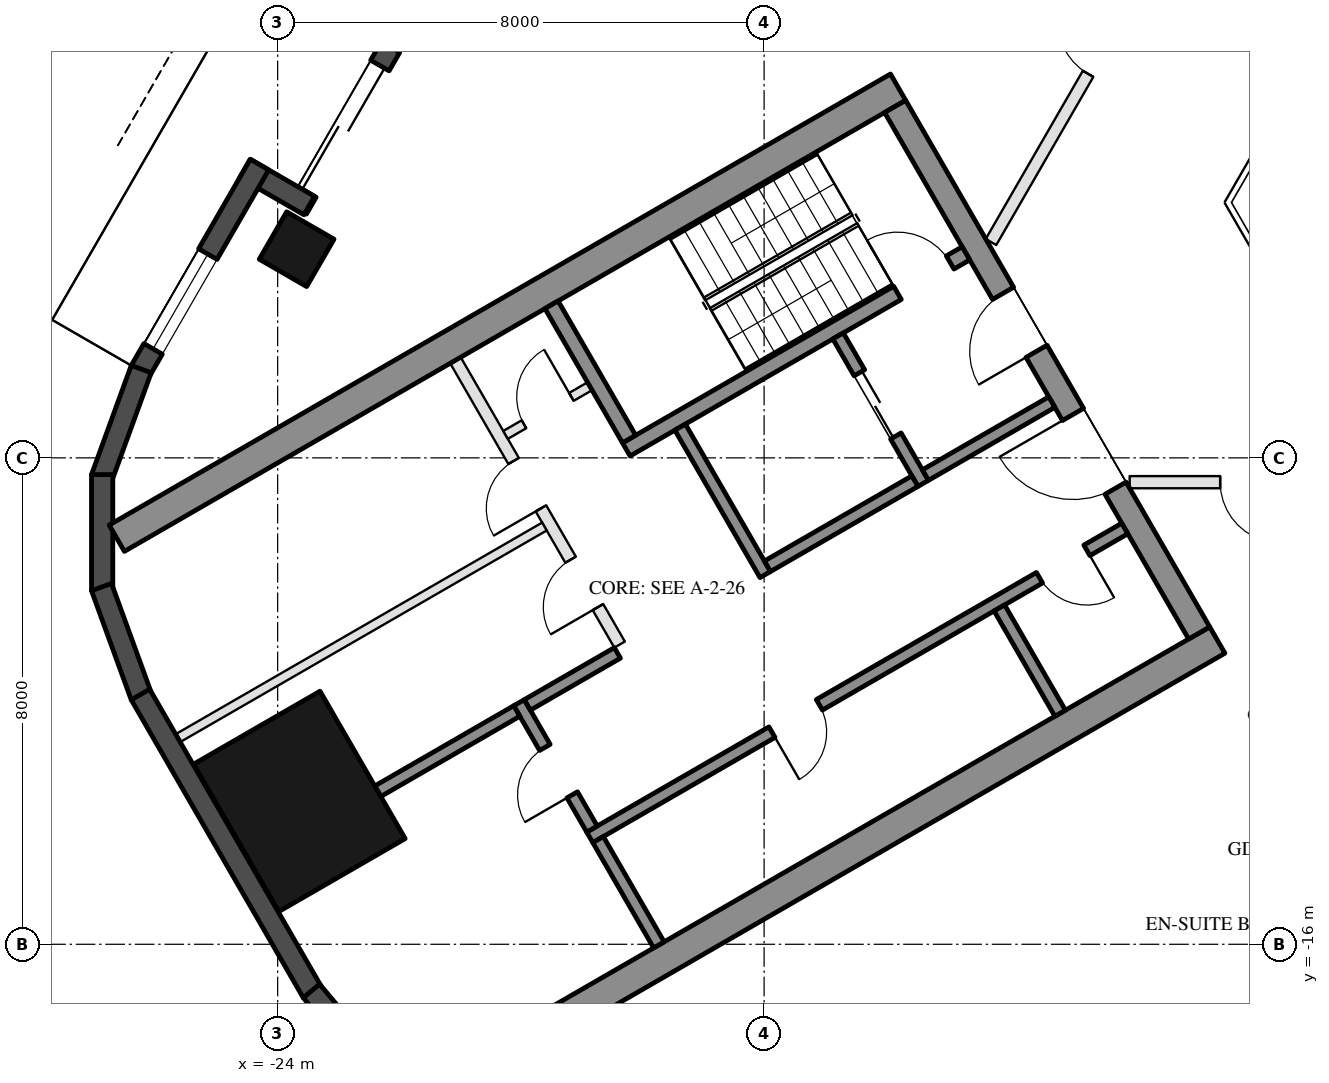
"""IFC4 building model, lengths in metres.
Left out: names, types, materials, properties, quantities, classifications, styles, units other than length and angle.
Written with IfcOpenShell. Run it as: python <this file> out.ifc"""

import sys

from ifc_helpers import new_model, si_unit, direction, frame, frame_2d, origin, origin_2d, place, context, subcontext, project, spatial, rectangle, hollow_rectangle, extrude, element, fill, save


model = new_model("IFC4")
c1 = context("Model", 3, precision=1e-05, world=origin(), true_north=direction((0.0, 1.0)))
c2 = subcontext(c1, "Body", "Model", "MODEL_VIEW")
j1 = project(units=[si_unit("LENGTHUNIT", "METRE"), si_unit("PLANEANGLEUNIT", "RADIAN")], contexts=[c1])
p1 = place(None, origin())
s1 = spatial("IfcSite", under=j1, at=p1, CompositionType="ELEMENT")
p2 = place(p1, origin())
s2 = spatial("IfcBuilding", under=s1, at=p2, CompositionType="ELEMENT")
p3 = place(p2, frame((0.0, 0.0, 116.8)))
s3 = spatial("IfcBuildingStorey", under=s2, at=p3, CompositionType="ELEMENT", Elevation=116.8)
p4 = place(p3, frame((-23.688, -4.568, 0.0), z_axis=(0.0, 0.0, 1.0), x_axis=(0.5, 0.866025403784, 0.0)))
e1 = element("IfcColumn", 1, at=p4, inside=s3, PredefinedType="COLUMN", context=c2, shape_type="SweptSolid", body=[
    extrude(hollow_rectangle(XDim=0.9, YDim=0.9, WallThickness=0.04, at=origin_2d()), origin(), (0.0, 0.0, 1.0), 3.7),
])
p5 = place(p3, frame((-23.643, -13.65, 0.0), z_axis=(0.0, 0.0, 1.0), x_axis=(-0.5, 0.866025403784, 0.0)))
e2 = element("IfcColumn", 2, at=p5, inside=s3, PredefinedType="COLUMN", context=c2, shape_type="SweptSolid", body=[
    extrude(hollow_rectangle(XDim=2.8, YDim=2.4, WallThickness=0.07, at=origin_2d()), origin(), (0.0, 0.0, 1.0), 3.7),
])
p6 = place(p3, frame((-20.309, 1.934, 0.0), z_axis=(0.0, 0.0, 1.0), x_axis=(-0.499992114976, -0.866029956157, 0.0)))
e3 = element("IfcWall", 3, at=p6, inside=s3, PredefinedType="SOLIDWALL", context=c2, shape_type="SweptSolid", body=[
    extrude(rectangle(XDim=6.74, YDim=0.35, at=frame_2d((3.37, 0.0))), origin(), (0.0, 0.0, 1.0), 3.55),
])
p7 = place(p6, frame((4.02, 0.0, 0.0)))
e4 = element("IfcOpeningElement", 4, at=p7, cuts=e3, PredefinedType="OPENING", context=c2, shape_type="SweptSolid", body=[
    extrude(rectangle(XDim=2.4, YDim=2.4, at=frame_2d((1.2, 1.2))), frame((0.0, 0.185, 0.0), z_axis=(0.0, -1.0, 0.0), x_axis=(1.0, 0.0, 0.0)), (0.0, 0.0, 1.0), 0.37),
])
p8 = place(p6, frame((0.77, 0.0, 0.3)))
e5 = element("IfcOpeningElement", 5, at=p8, cuts=e3, PredefinedType="OPENING", context=c2, shape_type="SweptSolid", body=[
    extrude(rectangle(XDim=2.9, YDim=2.65, at=frame_2d((1.45, 1.325))), frame((0.0, 0.185, 0.0), z_axis=(0.0, -1.0, 0.0), x_axis=(1.0, 0.0, 0.0)), (0.0, 0.0, 1.0), 0.37),
])
p9 = place(p3, frame((-23.481, -3.85, 0.0), z_axis=(0.0, 0.0, 1.0), x_axis=(-0.866092288191, 0.499884134912, 0.0)))
e6 = element("IfcWall", 6, at=p9, inside=s3, PredefinedType="SOLIDWALL", context=c2, shape_type="SweptSolid", body=[
    extrude(rectangle(XDim=1.22, YDim=0.35, at=frame_2d((0.61, 0.0))), origin(), (0.0, 0.0, 1.0), 3.55),
])
p10 = place(p3, frame((-24.299, -3.176, 0.0), z_axis=(0.0, 0.0, 1.0), x_axis=(-0.500028278809, -0.866009076391, 0.0)))
e7 = element("IfcWall", 7, at=p10, inside=s3, PredefinedType="SOLIDWALL", context=c2, shape_type="SweptSolid", body=[
    extrude(rectangle(XDim=3.916, YDim=0.35, at=frame_2d((1.958, 0.0))), origin(), (0.0, 0.0, 1.0), 3.55),
])
p11 = place(p10, frame((1.7, 0.0, 0.3)))
e8 = element("IfcOpeningElement", 8, at=p11, cuts=e7, PredefinedType="OPENING", context=c2, shape_type="SweptSolid", body=[
    extrude(rectangle(XDim=1.8, YDim=2.65, at=frame_2d((0.9, 1.325))), frame((0.0, 0.185, 0.0), z_axis=(0.0, -1.0, 0.0), x_axis=(1.0, 0.0, 0.0)), (0.0, 0.0, 1.0), 0.37),
])
for number, where, z_axis, x_axis in (
    (9, (-26.244, -6.54, 0.0), (0.0, 0.0, 1.0), (-0.342, -0.94, 0.0)),
    (10, (-26.886, -8.275, 0.0), (0.0, 0.0, 1.0), (0.0, -1.0, 0.0)),
    (11, (-26.897, -10.125, 0.0), (0.0, 0.0, 1.0), (0.342, -0.94, 0.0)),
):
    element("IfcWall", number, at=place(p3, frame(where, z_axis=z_axis, x_axis=x_axis)), inside=s3, PredefinedType="SOLIDWALL", context=c2, shape_type="SweptSolid", body=[
        extrude(rectangle(XDim=1.91, YDim=0.35, at=frame_2d((0.955, 0.0))), origin(), (0.0, 0.0, 1.0), 3.55),
    ])
p12 = place(p3, frame((-26.257, -11.893, 0.0), z_axis=(0.0, 0.0, 1.0), x_axis=(0.500018773155, -0.866014564827, 0.0)))
e12 = element("IfcWall", 12, at=p12, inside=s3, PredefinedType="SOLIDWALL", context=c2, shape_type="SweptSolid", body=[
    extrude(rectangle(XDim=5.658, YDim=0.35, at=frame_2d((2.829, 0.0))), origin(), (0.0, 0.0, 1.0), 3.55),
])
p13 = place(p3, frame((-23.445, -16.768, 0.0), z_axis=(0.0, 0.0, 1.0), x_axis=(0.642733291068, -0.76609001857, 0.0)))
e13 = element("IfcWall", 13, at=p13, inside=s3, PredefinedType="SOLIDWALL", context=c2, shape_type="SweptSolid", body=[
    extrude(rectangle(XDim=1.91, YDim=0.35, at=frame_2d((0.955, 0.0))), origin(), (0.0, 0.0, 1.0), 3.55),
])
for number, where, z_axis, x_axis in (
    (14, (-13.797, -1.903, 0.0), (0.0, 0.0, 1.0), (-0.866, -0.5, 0.0)),
    (15, (-8.547, -10.997, 0.0), (0.0, 0.0, 1.0), (-0.866, -0.5, 0.0)),
):
    element("IfcWall", number, at=place(p3, frame(where, z_axis=z_axis, x_axis=x_axis)), inside=s3, PredefinedType="SHEAR", context=c2, shape_type="SweptSolid", body=[
        extrude(rectangle(XDim=14.837, YDim=0.5, at=frame_2d((7.418, 0.0))), origin(), (0.0, 0.0, 1.0), 3.5),
    ])
p14 = place(p3, frame((-13.845, -2.22, 0.0), z_axis=(0.0, 0.0, 1.0), x_axis=(0.500004234368, -0.866022959057, 0.0)))
e16 = element("IfcWall", 16, at=p14, inside=s3, PredefinedType="SHEAR", context=c2, shape_type="SweptSolid", body=[
    extrude(rectangle(XDim=10.0, YDim=0.4, at=frame_2d((5.0, 0.0))), origin(), (0.0, 0.0, 1.0), 3.5),
])
p15 = place(p14, frame((3.55, 0.0, 0.0)))
e17 = element("IfcOpeningElement", 17, at=p15, cuts=e16, PredefinedType="OPENING", context=c2, shape_type="SweptSolid", body=[
    extrude(rectangle(XDim=1.1, YDim=2.1, at=frame_2d((0.55, 1.05))), frame((0.0, 0.21, 0.0), z_axis=(0.0, -1.0, 0.0), x_axis=(1.0, 0.0, 0.0)), (0.0, 0.0, 1.0), 0.42),
])
p16 = place(p14, frame((5.85, 0.0, 0.0)))
e18 = element("IfcOpeningElement", 18, at=p16, cuts=e16, PredefinedType="OPENING", context=c2, shape_type="SweptSolid", body=[
    extrude(rectangle(XDim=1.4, YDim=2.1, at=frame_2d((0.7, 1.05))), frame((0.0, 0.21, 0.0), z_axis=(0.0, -1.0, 0.0), x_axis=(1.0, 0.0, 0.0)), (0.0, 0.0, 1.0), 0.42),
])
p17 = place(p3, frame((-12.681, -4.636, 0.0), z_axis=(0.0, 0.0, 1.0), x_axis=(-0.866021702275, -0.500006411147, 0.0)))
e19 = element("IfcWall", 19, at=p17, inside=s3, PredefinedType="SHEAR", context=c2, shape_type="SweptSolid", body=[
    extrude(rectangle(XDim=6.45, YDim=0.25, at=frame_2d((3.225, 0.0))), origin(), (0.0, 0.0, 1.0), 3.5),
])
p18 = place(p17, frame((0.3, 0.0, 0.0)))
e20 = element("IfcOpeningElement", 20, at=p18, cuts=e19, PredefinedType="OPENING", context=c2, shape_type="SweptSolid", body=[
    extrude(rectangle(XDim=1.0, YDim=2.1, at=frame_2d((0.5, 1.05))), frame((0.0, 0.135, 0.0), z_axis=(0.0, -1.0, 0.0), x_axis=(1.0, 0.0, 0.0)), (0.0, 0.0, 1.0), 0.27),
])
p19 = place(p3, frame((-19.496, -5.482, 0.0), z_axis=(0.0, 0.0, 1.0), x_axis=(0.499990435942, -0.866030925526, 0.0)))
e21 = element("IfcWall", 21, at=p19, inside=s3, PredefinedType="SHEAR", context=c2, shape_type="SweptSolid", body=[
    extrude(rectangle(XDim=2.55, YDim=0.25, at=frame_2d((1.275, 0.0))), origin(), (0.0, 0.0, 1.0), 3.5),
])
p20 = place(p3, frame((-17.381, -7.495, 0.0), z_axis=(0.0, 0.0, 1.0), x_axis=(0.500011755427, -0.866018616679, 0.0)))
e22 = element("IfcWall", 22, at=p20, inside=s3, PredefinedType="SHEAR", context=c2, shape_type="SweptSolid", body=[
    extrude(rectangle(XDim=2.8, YDim=0.2, at=frame_2d((1.4, 0.0))), origin(), (0.0, 0.0, 1.0), 3.5),
])
p21 = place(p3, frame((-14.783, -5.995, 0.0), z_axis=(0.0, 0.0, 1.0), x_axis=(0.49994636267, -0.866056369097, 0.0)))
e23 = element("IfcWall", 23, at=p21, inside=s3, PredefinedType="SHEAR", context=c2, shape_type="SweptSolid", body=[
    extrude(rectangle(XDim=2.8, YDim=0.2, at=frame_2d((1.4, 0.0))), origin(), (0.0, 0.0, 1.0), 3.5),
])
p22 = place(p21, frame((0.7, 0.0, 0.0)))
e24 = element("IfcOpeningElement", 24, at=p22, cuts=e23, PredefinedType="OPENING", context=c2, shape_type="SweptSolid", body=[
    extrude(rectangle(XDim=1.2, YDim=2.1, at=frame_2d((0.6, 1.05))), frame((0.0, 0.11, 0.0), z_axis=(0.0, -1.0, 0.0), x_axis=(1.0, 0.0, 0.0)), (0.0, 0.0, 1.0), 0.22),
])
p23 = place(p3, frame((-13.52, -8.383, 0.0), z_axis=(0.0, 0.0, 1.0), x_axis=(-0.866034573852, -0.49998411664, 0.0)))
e25 = element("IfcWall", 25, at=p23, inside=s3, PredefinedType="SHEAR", context=c2, shape_type="SweptSolid", body=[
    extrude(rectangle(XDim=2.8, YDim=0.2, at=frame_2d((1.4, 0.0))), origin(), (0.0, 0.0, 1.0), 3.5),
])
p24 = place(p3, frame((-11.268, -7.083, 0.0), z_axis=(0.0, 0.0, 1.0), x_axis=(-0.866050077142, -0.499957262057, 0.0)))
e26 = element("IfcWall", 26, at=p24, inside=s3, PredefinedType="SHEAR", context=c2, shape_type="SweptSolid", body=[
    extrude(rectangle(XDim=2.4, YDim=0.2, at=frame_2d((1.2, 0.0))), origin(), (0.0, 0.0, 1.0), 3.5),
])
p25 = place(p3, frame((-10.068, -9.162, 0.0), z_axis=(0.0, 0.0, 1.0), x_axis=(-0.866032725843, -0.499987317609, 0.0)))
e27 = element("IfcWall", 27, at=p25, inside=s3, PredefinedType="SHEAR", context=c2, shape_type="SweptSolid", body=[
    extrude(rectangle(XDim=10.16, YDim=0.2, at=frame_2d((5.08, 0.0))), origin(), (0.0, 0.0, 1.0), 3.5),
])
p26 = place(p25, frame((0.72, 0.0, 0.0)))
e28 = element("IfcOpeningElement", 28, at=p26, cuts=e27, PredefinedType="OPENING", context=c2, shape_type="SweptSolid", body=[
    extrude(rectangle(XDim=0.9, YDim=2.1, at=frame_2d((0.45, 1.05))), frame((0.0, 0.11, 0.0), z_axis=(0.0, -1.0, 0.0), x_axis=(1.0, 0.0, 0.0)), (0.0, 0.0, 1.0), 0.22),
])
p27 = place(p25, frame((5.8, 0.0, 0.0)))
e29 = element("IfcOpeningElement", 29, at=p27, cuts=e27, PredefinedType="OPENING", context=c2, shape_type="SweptSolid", body=[
    extrude(rectangle(XDim=0.9, YDim=2.1, at=frame_2d((0.45, 1.05))), frame((0.0, 0.11, 0.0), z_axis=(0.0, -1.0, 0.0), x_axis=(1.0, 0.0, 0.0)), (0.0, 0.0, 1.0), 0.22),
])
p28 = place(p3, frame((-20.031, -12.026, 0.0), z_axis=(0.0, 0.0, 1.0), x_axis=(0.500033551112, -0.866006032174, 0.0)))
e30 = element("IfcWall", 30, at=p28, inside=s3, PredefinedType="SHEAR", context=c2, shape_type="SweptSolid", body=[
    extrude(rectangle(XDim=2.4, YDim=0.2, at=frame_2d((1.2, 0.0))), origin(), (0.0, 0.0, 1.0), 3.5),
])
p29 = place(p28, frame((0.85, 0.0, 0.0)))
e31 = element("IfcOpeningElement", 31, at=p29, cuts=e30, PredefinedType="OPENING", context=c2, shape_type="SweptSolid", body=[
    extrude(rectangle(XDim=0.9, YDim=2.1, at=frame_2d((0.45, 1.05))), frame((0.0, 0.11, 0.0), z_axis=(0.0, -1.0, 0.0), x_axis=(1.0, 0.0, 0.0)), (0.0, 0.0, 1.0), 0.22),
])
p30 = place(p3, frame((-18.413, -11.208, 0.0), z_axis=(0.0, 0.0, 1.0), x_axis=(-0.866038183914, -0.499977863513, 0.0)))
e32 = element("IfcWall", 32, at=p30, inside=s3, PredefinedType="SHEAR", context=c2, shape_type="SweptSolid", body=[
    extrude(rectangle(XDim=1.71, YDim=0.2, at=frame_2d((0.855, 0.0))), origin(), (0.0, 0.0, 1.0), 3.5),
])
for number, where, z_axis, x_axis in (
    (33, (-12.131, -10.468, 0.0), (0.0, 0.0, 1.0), (0.5, -0.866, 0.0)),
    (34, (-18.73, -14.278, 0.0), (0.0, 0.0, 1.0), (0.5, -0.866, 0.0)),
):
    element("IfcWall", number, at=place(p3, frame(where, z_axis=z_axis, x_axis=x_axis)), inside=s3, PredefinedType="SHEAR", context=c2, shape_type="SweptSolid", body=[
        extrude(rectangle(XDim=2.0, YDim=0.2, at=frame_2d((1.0, 0.0))), origin(), (0.0, 0.0, 1.0), 3.5),
    ])
p31 = place(p3, frame((-20.067, -12.163, 0.0), z_axis=(0.0, 0.0, 1.0), x_axis=(-0.866060851709, -0.499938597367, 0.0)))
e35 = element("IfcWall", 35, at=p31, inside=s3, PredefinedType="SHEAR", context=c2, shape_type="SweptSolid", body=[
    extrude(rectangle(XDim=2.64, YDim=0.2, at=frame_2d((1.32, 0.0))), origin(), (0.0, 0.0, 1.0), 3.5),
])
p32 = place(p3, frame((-21.076, -6.395, 0.0), z_axis=(0.0, 0.0, 1.0), x_axis=(0.50001468107, -0.866016927499, 0.0)))
e36 = element("IfcWall", 36, at=p32, inside=s3, PredefinedType="PARTITIONING", context=c2, shape_type="SweptSolid", body=[
    extrude(rectangle(XDim=5.4, YDim=0.2, at=frame_2d((2.7, 0.0))), origin(), (0.0, 0.0, 1.0), 3.5),
])
p33 = place(p32, frame((1.913, 0.0, 0.0)))
e37 = element("IfcOpeningElement", 37, at=p33, cuts=e36, PredefinedType="OPENING", context=c2, shape_type="SweptSolid", body=[
    extrude(rectangle(XDim=0.9, YDim=2.1, at=frame_2d((0.45, 1.05))), frame((0.0, 0.11, 0.0), z_axis=(0.0, -1.0, 0.0), x_axis=(1.0, 0.0, 0.0)), (0.0, 0.0, 1.0), 0.22),
])
p34 = place(p32, frame((3.788, 0.0, 0.0)))
e38 = element("IfcOpeningElement", 38, at=p34, cuts=e36, PredefinedType="OPENING", context=c2, shape_type="SweptSolid", body=[
    extrude(rectangle(XDim=0.9, YDim=2.1, at=frame_2d((0.45, 1.05))), frame((0.0, 0.11, 0.0), z_axis=(0.0, -1.0, 0.0), x_axis=(1.0, 0.0, 0.0)), (0.0, 0.0, 1.0), 0.22),
])
p35 = place(p3, frame((-18.866, -6.822, 0.0), z_axis=(0.0, 0.0, 1.0), x_axis=(-0.866028054938, -0.499995408039, 0.0)))
e39 = element("IfcWall", 39, at=p35, inside=s3, PredefinedType="PARTITIONING", context=c2, shape_type="SweptSolid", body=[
    extrude(rectangle(XDim=1.6, YDim=0.15, at=frame_2d((0.8, 0.0))), origin(), (0.0, 0.0, 1.0), 3.5),
])
p36 = place(p35, frame((0.35, 0.0, 0.0)))
e40 = element("IfcOpeningElement", 40, at=p36, cuts=e39, PredefinedType="OPENING", context=c2, shape_type="SweptSolid", body=[
    extrude(rectangle(XDim=0.9, YDim=2.1, at=frame_2d((0.45, 1.05))), frame((0.0, 0.085, 0.0), z_axis=(0.0, -1.0, 0.0), x_axis=(1.0, 0.0, 0.0)), (0.0, 0.0, 1.0), 0.17),
])
p37 = place(p3, frame((-19.613, -9.13, 0.0), z_axis=(0.0, 0.0, 1.0), x_axis=(-0.866031734426, -0.499989034847, 0.0)))
e41 = element("IfcWall", 41, at=p37, inside=s3, PredefinedType="PARTITIONING", context=c2, shape_type="SweptSolid", body=[
    extrude(rectangle(XDim=6.95, YDim=0.15, at=frame_2d((3.475, 0.0))), origin(), (0.0, 0.0, 1.0), 3.5),
])
p38 = place(p3, frame((-6.011, -8.4, 0.0), z_axis=(0.0, 0.0, 1.0), x_axis=(-1.0, 0.0, 0.0)))
e42 = element("IfcWall", 42, at=p38, inside=s3, PredefinedType="PARTITIONING", context=c2, shape_type="SweptSolid", body=[
    extrude(rectangle(XDim=3.977, YDim=0.2, at=frame_2d((1.988, 0.0))), origin(), (0.0, 0.0, 1.0), 2.95),
])
p39 = place(p38, frame((1.488, 0.0, 0.0)))
e43 = element("IfcOpeningElement", 43, at=p39, cuts=e42, PredefinedType="OPENING", context=c2, shape_type="SweptSolid", body=[
    extrude(rectangle(XDim=1.0, YDim=2.1, at=frame_2d((0.5, 1.05))), frame((0.0, 0.11, 0.0), z_axis=(0.0, -1.0, 0.0), x_axis=(1.0, 0.0, 0.0)), (0.0, 0.0, 1.0), 0.22),
])
p40 = place(p3, frame((-12.269, -4.45, 0.0), z_axis=(0.0, 0.0, 1.0), x_axis=(0.500009454961, 0.866019944892, 0.0)))
e44 = element("IfcWall", 44, at=p40, inside=s3, PredefinedType="PARTITIONING", context=c2, shape_type="SweptSolid", body=[
    extrude(rectangle(XDim=7.388, YDim=0.2, at=frame_2d((3.694, 0.0))), origin(), (0.0, 0.0, 1.0), 2.95),
])
p41 = place(p40, frame((3.194, 0.0, 0.0)))
e45 = element("IfcOpeningElement", 45, at=p41, cuts=e44, PredefinedType="OPENING", context=c2, shape_type="SweptSolid", body=[
    extrude(rectangle(XDim=1.0, YDim=2.1, at=frame_2d((0.5, 1.05))), frame((0.0, 0.11, 0.0), z_axis=(0.0, -1.0, 0.0), x_axis=(1.0, 0.0, 0.0)), (0.0, 0.0, 1.0), 0.22),
])
p42 = place(p7, frame((2.4, 0.0, 0.0), z_axis=(0.0, 0.0, 1.0), x_axis=(-1.0, 0.0, 0.0)))
e46 = element("IfcDoor", 46, at=p42, inside=s3, OperationType="SLIDING_TO_LEFT", PredefinedType="DOOR", context=c2, shape_type="SweptSolid", body=[
    extrude(rectangle(XDim=2.4, YDim=2.4, at=frame_2d((1.2, 1.2))), frame((0.0, 0.025, 0.0), z_axis=(0.0, -1.0, 0.0), x_axis=(1.0, 0.0, 0.0)), (0.0, 0.0, 1.0), 0.05),
])
fill(e4, e46)
p43 = place(p11, origin())
e47 = element("IfcWindow", 47, at=p43, inside=s3, PartitioningType="SINGLE_PANEL", PredefinedType="WINDOW", context=c2, shape_type="SweptSolid", body=[
    extrude(rectangle(XDim=1.8, YDim=2.65, at=frame_2d((0.9, 1.325))), frame((0.0, 0.03, 0.0), z_axis=(0.0, -1.0, 0.0), x_axis=(1.0, 0.0, 0.0)), (0.0, 0.0, 1.0), 0.06),
])
fill(e8, e47)
p44 = place(p22, origin())
e48 = element("IfcDoor", 48, at=p44, inside=s3, OperationType="DOUBLE_DOOR_SLIDING", PredefinedType="DOOR", context=c2, shape_type="SweptSolid", body=[
    extrude(rectangle(XDim=1.2, YDim=2.1, at=frame_2d((0.6, 1.05))), frame((0.0, 0.025, 0.0), z_axis=(0.0, -1.0, 0.0), x_axis=(1.0, 0.0, 0.0)), (0.0, 0.0, 1.0), 0.05),
])
fill(e24, e48)
p45 = place(p36, frame((0.9, 0.0, 0.0), z_axis=(0.0, 0.0, 1.0), x_axis=(-1.0, 0.0, 0.0)))
e49 = element("IfcDoor", 49, at=p45, inside=s3, OperationType="SINGLE_SWING_RIGHT", PredefinedType="DOOR", context=c2, shape_type="SweptSolid", body=[
    extrude(rectangle(XDim=0.9, YDim=2.1, at=frame_2d((0.45, 1.05))), frame((0.0, 0.025, 0.0), z_axis=(0.0, -1.0, 0.0), x_axis=(1.0, 0.0, 0.0)), (0.0, 0.0, 1.0), 0.05),
])
fill(e40, e49)
p46 = place(p26, origin())
e50 = element("IfcDoor", 50, at=p46, inside=s3, OperationType="SINGLE_SWING_LEFT", PredefinedType="DOOR", context=c2, shape_type="SweptSolid", body=[
    extrude(rectangle(XDim=0.9, YDim=2.1, at=frame_2d((0.45, 1.05))), frame((0.0, 0.025, 0.0), z_axis=(0.0, -1.0, 0.0), x_axis=(1.0, 0.0, 0.0)), (0.0, 0.0, 1.0), 0.05),
])
fill(e28, e50)
p47 = place(p27, origin())
e51 = element("IfcDoor", 51, at=p47, inside=s3, OperationType="SINGLE_SWING_RIGHT", PredefinedType="DOOR", context=c2, shape_type="SweptSolid", body=[
    extrude(rectangle(XDim=0.9, YDim=2.1, at=frame_2d((0.45, 1.05))), frame((0.0, 0.025, 0.0), z_axis=(0.0, -1.0, 0.0), x_axis=(1.0, 0.0, 0.0)), (0.0, 0.0, 1.0), 0.05),
])
fill(e29, e51)
p48 = place(p29, frame((0.9, 0.0, 0.0), z_axis=(0.0, 0.0, 1.0), x_axis=(-1.0, 0.0, 0.0)))
e52 = element("IfcDoor", 52, at=p48, inside=s3, OperationType="SINGLE_SWING_LEFT", PredefinedType="DOOR", context=c2, shape_type="SweptSolid", body=[
    extrude(rectangle(XDim=0.9, YDim=2.1, at=frame_2d((0.45, 1.05))), frame((0.0, 0.025, 0.0), z_axis=(0.0, -1.0, 0.0), x_axis=(1.0, 0.0, 0.0)), (0.0, 0.0, 1.0), 0.05),
])
fill(e31, e52)
p49 = place(p33, frame((0.9, 0.0, 0.0), z_axis=(0.0, 0.0, 1.0), x_axis=(-1.0, 0.0, 0.0)))
e53 = element("IfcDoor", 53, at=p49, inside=s3, OperationType="SINGLE_SWING_LEFT", PredefinedType="DOOR", context=c2, shape_type="SweptSolid", body=[
    extrude(rectangle(XDim=0.9, YDim=2.1, at=frame_2d((0.45, 1.05))), frame((0.0, 0.025, 0.0), z_axis=(0.0, -1.0, 0.0), x_axis=(1.0, 0.0, 0.0)), (0.0, 0.0, 1.0), 0.05),
])
fill(e37, e53)
p50 = place(p34, frame((0.9, 0.0, 0.0), z_axis=(0.0, 0.0, 1.0), x_axis=(-1.0, 0.0, 0.0)))
e54 = element("IfcDoor", 54, at=p50, inside=s3, OperationType="SINGLE_SWING_LEFT", PredefinedType="DOOR", context=c2, shape_type="SweptSolid", body=[
    extrude(rectangle(XDim=0.9, YDim=2.1, at=frame_2d((0.45, 1.05))), frame((0.0, 0.025, 0.0), z_axis=(0.0, -1.0, 0.0), x_axis=(1.0, 0.0, 0.0)), (0.0, 0.0, 1.0), 0.05),
])
fill(e38, e54)
p51 = place(p15, frame((1.1, 0.0, 0.0), z_axis=(0.0, 0.0, 1.0), x_axis=(-1.0, 0.0, 0.0)))
e55 = element("IfcDoor", 55, at=p51, inside=s3, OperationType="SINGLE_SWING_LEFT", PredefinedType="DOOR", context=c2, shape_type="SweptSolid", body=[
    extrude(rectangle(XDim=1.1, YDim=2.1, at=frame_2d((0.55, 1.05))), frame((0.0, 0.025, 0.0), z_axis=(0.0, -1.0, 0.0), x_axis=(1.0, 0.0, 0.0)), (0.0, 0.0, 1.0), 0.05),
])
fill(e17, e55)
p52 = place(p16, frame((1.4, 0.0, 0.0), z_axis=(0.0, 0.0, 1.0), x_axis=(-1.0, 0.0, 0.0)))
e56 = element("IfcDoor", 56, at=p52, inside=s3, OperationType="DOUBLE_DOOR_SINGLE_SWING", PredefinedType="DOOR", context=c2, shape_type="SweptSolid", body=[
    extrude(rectangle(XDim=1.4, YDim=2.1, at=frame_2d((0.7, 1.05))), frame((0.0, 0.025, 0.0), z_axis=(0.0, -1.0, 0.0), x_axis=(1.0, 0.0, 0.0)), (0.0, 0.0, 1.0), 0.05),
])
fill(e18, e56)
p53 = place(p18, frame((1.0, 0.0, 0.0), z_axis=(0.0, 0.0, 1.0), x_axis=(-1.0, 0.0, 0.0)))
e57 = element("IfcDoor", 57, at=p53, inside=s3, OperationType="SINGLE_SWING_LEFT", PredefinedType="DOOR", context=c2, shape_type="SweptSolid", body=[
    extrude(rectangle(XDim=1.0, YDim=2.1, at=frame_2d((0.5, 1.05))), frame((0.0, 0.025, 0.0), z_axis=(0.0, -1.0, 0.0), x_axis=(1.0, 0.0, 0.0)), (0.0, 0.0, 1.0), 0.05),
])
fill(e20, e57)
p54 = place(p39, origin())
e58 = element("IfcDoor", 58, at=p54, inside=s3, OperationType="SINGLE_SWING_LEFT", PredefinedType="DOOR", context=c2, shape_type="SweptSolid", body=[
    extrude(rectangle(XDim=1.0, YDim=2.1, at=frame_2d((0.5, 1.05))), frame((0.0, 0.025, 0.0), z_axis=(0.0, -1.0, 0.0), x_axis=(1.0, 0.0, 0.0)), (0.0, 0.0, 1.0), 0.05),
])
fill(e43, e58)
p55 = place(p41, origin())
e59 = element("IfcDoor", 59, at=p55, inside=s3, OperationType="SINGLE_SWING_RIGHT", PredefinedType="DOOR", context=c2, shape_type="SweptSolid", body=[
    extrude(rectangle(XDim=1.0, YDim=2.1, at=frame_2d((0.5, 1.05))), frame((0.0, 0.025, 0.0), z_axis=(0.0, -1.0, 0.0), x_axis=(1.0, 0.0, 0.0)), (0.0, 0.0, 1.0), 0.05),
])
fill(e45, e59)
save(model, sys.argv[1])
